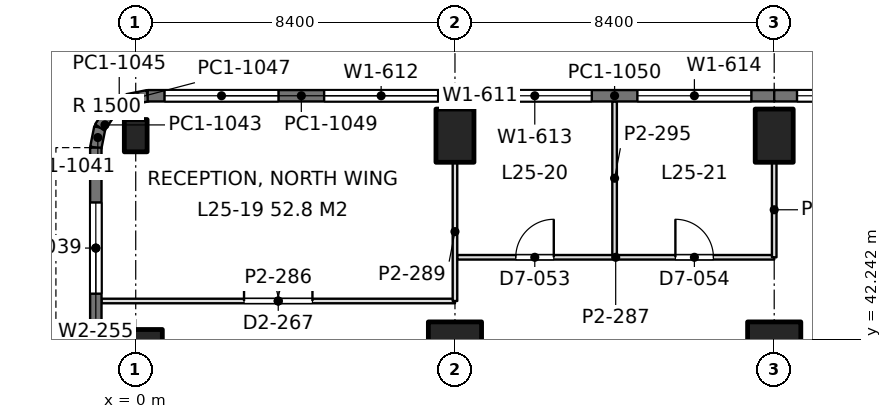
"""IFC4 building model, lengths in metres.
Left out: names, types, materials, properties, quantities, classifications, styles, units other than length and angle.
Written with IfcOpenShell. Run it as: python <this file> out.ifc"""

import sys

from ifc_helpers import new_model, si_unit, direction, frame, frame_2d, origin, origin_2d, place, context, subcontext, project, spatial, rectangle, extrude, element, fill, save


model = new_model("IFC4")
c1 = context("Model", 3, precision=1e-05, world=origin(), true_north=direction((0.0, 1.0)))
c2 = subcontext(c1, "Body", "Model", "MODEL_VIEW")
j1 = project(units=[si_unit("LENGTHUNIT", "METRE"), si_unit("PLANEANGLEUNIT", "RADIAN")], contexts=[c1])
p1 = place(None, origin())
s1 = spatial("IfcSite", under=j1, at=p1, CompositionType="ELEMENT")
p2 = place(p1, origin())
s2 = spatial("IfcBuilding", under=s1, at=p2, CompositionType="ELEMENT")
p3 = place(p2, frame((0.0, 0.0, 113.4)))
s3 = spatial("IfcBuildingStorey", under=s2, at=p3, CompositionType="ELEMENT", Elevation=113.4)
p4 = place(p3, frame((0.0, 42.0, 0.0), z_axis=(0.0, 0.0, 1.0), x_axis=(0.0, 1.0, 0.0)))
e1 = element("IfcColumn", 1, at=p4, inside=s3, PredefinedType="COLUMN", context=c2, shape_type="SweptSolid", body=[
    extrude(rectangle(XDim=1.0, YDim=1.4, at=origin_2d()), origin(), (0.0, 0.0, 1.0), 4.2),
])
p5 = place(p3, frame((0.0, 47.6, 0.0), z_axis=(0.0, 0.0, 1.0), x_axis=(1.0, 0.0, 0.0)))
e2 = element("IfcColumn", 2, at=p5, inside=s3, PredefinedType="COLUMN", context=c2, shape_type="SweptSolid", body=[
    extrude(rectangle(XDim=0.6, YDim=0.85, at=origin_2d()), origin(), (0.0, 0.0, 1.0), 4.2),
])
p6 = place(p3, frame((8.4, 42.0, 0.0), z_axis=(0.0, 0.0, 1.0), x_axis=(1.0, 0.0, 0.0)))
e3 = element("IfcColumn", 3, at=p6, inside=s3, PredefinedType="COLUMN", context=c2, shape_type="SweptSolid", body=[
    extrude(rectangle(XDim=1.4, YDim=1.4, at=origin_2d()), origin(), (0.0, 0.0, 1.0), 4.2),
])
p7 = place(p3, frame((8.4, 47.6, 0.0), z_axis=(0.0, 0.0, 1.0), x_axis=(1.0, 0.0, 0.0)))
e4 = element("IfcColumn", 4, at=p7, inside=s3, PredefinedType="COLUMN", context=c2, shape_type="SweptSolid", body=[
    extrude(rectangle(XDim=1.0, YDim=1.4, at=origin_2d()), origin(), (0.0, 0.0, 1.0), 4.2),
])
p8 = place(p3, frame((16.8, 42.0, 0.0), z_axis=(0.0, 0.0, 1.0), x_axis=(1.0, 0.0, 0.0)))
e5 = element("IfcColumn", 5, at=p8, inside=s3, PredefinedType="COLUMN", context=c2, shape_type="SweptSolid", body=[
    extrude(rectangle(XDim=1.4, YDim=1.4, at=origin_2d()), origin(), (0.0, 0.0, 1.0), 4.2),
])
p9 = place(p3, frame((16.8, 47.6, 0.0), z_axis=(0.0, 0.0, 1.0), x_axis=(1.0, 0.0, 0.0)))
e6 = element("IfcColumn", 6, at=p9, inside=s3, PredefinedType="COLUMN", context=c2, shape_type="SweptSolid", body=[
    extrude(rectangle(XDim=1.0, YDim=1.4, at=origin_2d()), origin(), (0.0, 0.0, 1.0), 4.2),
])
p10 = place(p3, frame((-1.05, 42.0, 0.0), z_axis=(0.0, 0.0, 1.0), x_axis=(0.0, 1.0, 0.0)))
e7 = element("IfcWall", 7, at=p10, inside=s3, PredefinedType="SOLIDWALL", context=c2, shape_type="SweptSolid", body=[
    extrude(rectangle(XDim=5.285, YDim=0.3, at=frame_2d((2.643, 0.0))), origin(), (0.0, 0.0, 1.0), 4.05),
])
p11 = place(p10, frame((1.443, 0.0, 0.9)))
e8 = element("IfcOpeningElement", 8, at=p11, cuts=e7, PredefinedType="OPENING", context=c2, shape_type="SweptSolid", body=[
    extrude(rectangle(XDim=2.4, YDim=1.9, at=frame_2d((1.2, 0.95))), frame((0.0, 0.16, 0.0), z_axis=(0.0, -1.0, 0.0), x_axis=(1.0, 0.0, 0.0)), (0.0, 0.0, 1.0), 0.32),
])
p12 = place(p3, frame((-1.05, 47.285, 0.0), z_axis=(0.0, 0.0, 1.0), x_axis=(0.195073962632, 0.980788534345, 0.0)))
e9 = element("IfcWall", 9, at=p12, inside=s3, PredefinedType="SOLIDWALL", context=c2, shape_type="SweptSolid", body=[
    extrude(rectangle(XDim=0.541, YDim=0.3, at=frame_2d((0.271, 0.0))), origin(), (0.0, 0.0, 1.0), 4.05),
])
p13 = place(p3, frame((-0.945, 47.815, 0.0), z_axis=(0.0, 0.0, 1.0), x_axis=(0.55534295404, 0.831621430339, 0.0)))
e10 = element("IfcWall", 10, at=p13, inside=s3, PredefinedType="SOLIDWALL", context=c2, shape_type="SweptSolid", body=[
    extrude(rectangle(XDim=0.526, YDim=0.3, at=frame_2d((0.263, 0.0))), origin(), (0.0, 0.0, 1.0), 4.05),
])
p14 = place(p3, frame((-0.653, 48.253, 0.0), z_axis=(0.0, 0.0, 1.0), x_axis=(0.831692711774, 0.555236195849, 0.0)))
e11 = element("IfcWall", 11, at=p14, inside=s3, PredefinedType="SOLIDWALL", context=c2, shape_type="SweptSolid", body=[
    extrude(rectangle(XDim=0.525, YDim=0.3, at=frame_2d((0.263, 0.0))), origin(), (0.0, 0.0, 1.0), 4.05),
])
p15 = place(p3, frame((-0.216, 48.544, 0.0), z_axis=(0.0, 0.0, 1.0), x_axis=(0.980788534345, 0.195073962632, 0.0)))
e12 = element("IfcWall", 12, at=p15, inside=s3, PredefinedType="SOLIDWALL", context=c2, shape_type="SweptSolid", body=[
    extrude(rectangle(XDim=0.541, YDim=0.3, at=frame_2d((0.271, 0.0))), origin(), (0.0, 0.0, 1.0), 4.05),
])
p16 = place(p3, frame((0.315, 48.65, 0.0), z_axis=(0.0, 0.0, 1.0), x_axis=(1.0, 0.0, 0.0)))
e13 = element("IfcWall", 13, at=p16, inside=s3, PredefinedType="SOLIDWALL", context=c2, shape_type="SweptSolid", body=[
    extrude(rectangle(XDim=8.085, YDim=0.3, at=frame_2d((4.042, 0.0))), origin(), (0.0, 0.0, 1.0), 4.05),
])
p17 = place(p16, frame((0.443, 0.0, 0.9)))
e14 = element("IfcOpeningElement", 14, at=p17, cuts=e13, PredefinedType="OPENING", context=c2, shape_type="SweptSolid", body=[
    extrude(rectangle(XDim=3.0, YDim=1.9, at=frame_2d((1.5, 0.95))), frame((0.0, 0.16, 0.0), z_axis=(0.0, -1.0, 0.0), x_axis=(1.0, 0.0, 0.0)), (0.0, 0.0, 1.0), 0.32),
])
p18 = place(p16, frame((4.643, 0.0, 0.9)))
e15 = element("IfcOpeningElement", 15, at=p18, cuts=e13, PredefinedType="OPENING", context=c2, shape_type="SweptSolid", body=[
    extrude(rectangle(XDim=3.0, YDim=1.9, at=frame_2d((1.5, 0.95))), frame((0.0, 0.16, 0.0), z_axis=(0.0, -1.0, 0.0), x_axis=(1.0, 0.0, 0.0)), (0.0, 0.0, 1.0), 0.32),
])
p19 = place(p3, frame((8.4, 48.65, 0.0), z_axis=(0.0, 0.0, 1.0), x_axis=(1.0, 0.0, 0.0)))
e16 = element("IfcWall", 16, at=p19, inside=s3, PredefinedType="SOLIDWALL", context=c2, shape_type="SweptSolid", body=[
    extrude(rectangle(XDim=8.4, YDim=0.3, at=frame_2d((4.2, 0.0))), origin(), (0.0, 0.0, 1.0), 4.05),
])
p20 = place(p19, frame((0.6, 0.0, 0.9)))
e17 = element("IfcOpeningElement", 17, at=p20, cuts=e16, PredefinedType="OPENING", context=c2, shape_type="SweptSolid", body=[
    extrude(rectangle(XDim=3.0, YDim=1.9, at=frame_2d((1.5, 0.95))), frame((0.0, 0.16, 0.0), z_axis=(0.0, -1.0, 0.0), x_axis=(1.0, 0.0, 0.0)), (0.0, 0.0, 1.0), 0.32),
])
p21 = place(p19, frame((4.8, 0.0, 0.9)))
e18 = element("IfcOpeningElement", 18, at=p21, cuts=e16, PredefinedType="OPENING", context=c2, shape_type="SweptSolid", body=[
    extrude(rectangle(XDim=3.0, YDim=1.9, at=frame_2d((1.5, 0.95))), frame((0.0, 0.16, 0.0), z_axis=(0.0, -1.0, 0.0), x_axis=(1.0, 0.0, 0.0)), (0.0, 0.0, 1.0), 0.32),
])
p22 = place(p3, frame((16.8, 48.65, 0.0), z_axis=(0.0, 0.0, 1.0), x_axis=(1.0, 0.0, 0.0)))
e19 = element("IfcWall", 19, at=p22, inside=s3, PredefinedType="SOLIDWALL", context=c2, shape_type="SweptSolid", body=[
    extrude(rectangle(XDim=8.4, YDim=0.3, at=frame_2d((4.2, 0.0))), origin(), (0.0, 0.0, 1.0), 4.05),
])
p23 = place(p22, frame((0.6, 0.0, 0.9)))
e20 = element("IfcOpeningElement", 20, at=p23, cuts=e19, PredefinedType="OPENING", context=c2, shape_type="SweptSolid", body=[
    extrude(rectangle(XDim=3.0, YDim=1.9, at=frame_2d((1.5, 0.95))), frame((0.0, 0.16, 0.0), z_axis=(0.0, -1.0, 0.0), x_axis=(1.0, 0.0, 0.0)), (0.0, 0.0, 1.0), 0.32),
])
p24 = place(p22, frame((4.8, 0.0, 0.9)))
e21 = element("IfcOpeningElement", 21, at=p24, cuts=e19, PredefinedType="OPENING", context=c2, shape_type="SweptSolid", body=[
    extrude(rectangle(XDim=3.0, YDim=1.9, at=frame_2d((1.5, 0.95))), frame((0.0, 0.16, 0.0), z_axis=(0.0, -1.0, 0.0), x_axis=(1.0, 0.0, 0.0)), (0.0, 0.0, 1.0), 0.32),
])
p25 = place(p3, frame((-0.902, 43.25, 0.0), z_axis=(0.0, 0.0, 1.0), x_axis=(1.0, 0.0, 0.0)))
e22 = element("IfcWall", 22, at=p25, inside=s3, PredefinedType="PARTITIONING", context=c2, shape_type="SweptSolid", body=[
    extrude(rectangle(XDim=9.302, YDim=0.12, at=frame_2d((4.651, 0.0))), origin(), (0.0, 0.0, 1.0), 3.55),
])
p26 = place(p25, frame((3.752, 0.0, 0.0)))
e23 = element("IfcOpeningElement", 23, at=p26, cuts=e22, PredefinedType="OPENING", context=c2, shape_type="SweptSolid", body=[
    extrude(rectangle(XDim=1.8, YDim=2.2, at=frame_2d((0.9, 1.1))), frame((0.0, 0.07, 0.0), z_axis=(0.0, -1.0, 0.0), x_axis=(1.0, 0.0, 0.0)), (0.0, 0.0, 1.0), 0.14),
])
p27 = place(p3, frame((8.458, 44.4, 0.0), z_axis=(0.0, 0.0, 1.0), x_axis=(1.0, 0.0, 0.0)))
e24 = element("IfcWall", 24, at=p27, inside=s3, PredefinedType="PARTITIONING", context=c2, shape_type="SweptSolid", body=[
    extrude(rectangle(XDim=8.342, YDim=0.12, at=frame_2d((4.171, 0.0))), origin(), (0.0, 0.0, 1.0), 3.55),
])
p28 = place(p27, frame((1.542, 0.0, 0.0)))
e25 = element("IfcOpeningElement", 25, at=p28, cuts=e24, PredefinedType="OPENING", context=c2, shape_type="SweptSolid", body=[
    extrude(rectangle(XDim=1.0, YDim=2.4, at=frame_2d((0.5, 1.2))), frame((0.0, 0.07, 0.0), z_axis=(0.0, -1.0, 0.0), x_axis=(1.0, 0.0, 0.0)), (0.0, 0.0, 1.0), 0.14),
])
p29 = place(p27, frame((5.742, 0.0, 0.0)))
e26 = element("IfcOpeningElement", 26, at=p29, cuts=e24, PredefinedType="OPENING", context=c2, shape_type="SweptSolid", body=[
    extrude(rectangle(XDim=1.0, YDim=2.4, at=frame_2d((0.5, 1.2))), frame((0.0, 0.07, 0.0), z_axis=(0.0, -1.0, 0.0), x_axis=(1.0, 0.0, 0.0)), (0.0, 0.0, 1.0), 0.14),
])
p30 = place(p3, frame((8.4, 43.25, 0.0), z_axis=(0.0, 0.0, 1.0), x_axis=(0.0, 1.0, 0.0)))
e27 = element("IfcWall", 27, at=p30, inside=s3, PredefinedType="PARTITIONING", context=c2, shape_type="SweptSolid", body=[
    extrude(rectangle(XDim=3.651, YDim=0.12, at=frame_2d((1.825, 0.0))), origin(), (0.0, 0.0, 1.0), 3.55),
])
p31 = place(p3, frame((12.6, 44.458, 0.0), z_axis=(0.0, 0.0, 1.0), x_axis=(0.0, 1.0, 0.0)))
e28 = element("IfcWall", 28, at=p31, inside=s3, PredefinedType="PARTITIONING", context=c2, shape_type="SweptSolid", body=[
    extrude(rectangle(XDim=4.044, YDim=0.12, at=frame_2d((2.022, 0.0))), origin(), (0.0, 0.0, 1.0), 3.56),
])
p32 = place(p3, frame((16.8, 44.4, 0.0), z_axis=(0.0, 0.0, 1.0), x_axis=(0.0, 1.0, 0.0)))
e29 = element("IfcWall", 29, at=p32, inside=s3, PredefinedType="PARTITIONING", context=c2, shape_type="SweptSolid", body=[
    extrude(rectangle(XDim=2.501, YDim=0.12, at=frame_2d((1.25, 0.0))), origin(), (0.0, 0.0, 1.0), 3.55),
])
p33 = place(p11, origin())
e30 = element("IfcWindow", 30, at=p33, inside=s3, PartitioningType="SINGLE_PANEL", PredefinedType="WINDOW", context=c2, shape_type="SweptSolid", body=[
    extrude(rectangle(XDim=2.4, YDim=1.9, at=frame_2d((1.2, 0.95))), frame((0.0, 0.03, 0.0), z_axis=(0.0, -1.0, 0.0), x_axis=(1.0, 0.0, 0.0)), (0.0, 0.0, 1.0), 0.06),
])
fill(e8, e30)
p34 = place(p17, origin())
e31 = element("IfcWindow", 31, at=p34, inside=s3, PartitioningType="SINGLE_PANEL", PredefinedType="WINDOW", context=c2, shape_type="SweptSolid", body=[
    extrude(rectangle(XDim=3.0, YDim=1.9, at=frame_2d((1.5, 0.95))), frame((0.0, 0.03, 0.0), z_axis=(0.0, -1.0, 0.0), x_axis=(1.0, 0.0, 0.0)), (0.0, 0.0, 1.0), 0.06),
])
fill(e14, e31)
p35 = place(p18, origin())
e32 = element("IfcWindow", 32, at=p35, inside=s3, PartitioningType="SINGLE_PANEL", PredefinedType="WINDOW", context=c2, shape_type="SweptSolid", body=[
    extrude(rectangle(XDim=3.0, YDim=1.9, at=frame_2d((1.5, 0.95))), frame((0.0, 0.03, 0.0), z_axis=(0.0, -1.0, 0.0), x_axis=(1.0, 0.0, 0.0)), (0.0, 0.0, 1.0), 0.06),
])
fill(e15, e32)
p36 = place(p20, origin())
e33 = element("IfcWindow", 33, at=p36, inside=s3, PartitioningType="SINGLE_PANEL", PredefinedType="WINDOW", context=c2, shape_type="SweptSolid", body=[
    extrude(rectangle(XDim=3.0, YDim=1.9, at=frame_2d((1.5, 0.95))), frame((0.0, 0.03, 0.0), z_axis=(0.0, -1.0, 0.0), x_axis=(1.0, 0.0, 0.0)), (0.0, 0.0, 1.0), 0.06),
])
fill(e17, e33)
p37 = place(p21, origin())
e34 = element("IfcWindow", 34, at=p37, inside=s3, PartitioningType="SINGLE_PANEL", PredefinedType="WINDOW", context=c2, shape_type="SweptSolid", body=[
    extrude(rectangle(XDim=3.0, YDim=1.9, at=frame_2d((1.5, 0.95))), frame((0.0, 0.03, 0.0), z_axis=(0.0, -1.0, 0.0), x_axis=(1.0, 0.0, 0.0)), (0.0, 0.0, 1.0), 0.06),
])
fill(e18, e34)
p38 = place(p23, origin())
e35 = element("IfcWindow", 35, at=p38, inside=s3, PartitioningType="SINGLE_PANEL", PredefinedType="WINDOW", context=c2, shape_type="SweptSolid", body=[
    extrude(rectangle(XDim=3.0, YDim=1.9, at=frame_2d((1.5, 0.95))), frame((0.0, 0.03, 0.0), z_axis=(0.0, -1.0, 0.0), x_axis=(1.0, 0.0, 0.0)), (0.0, 0.0, 1.0), 0.06),
])
fill(e20, e35)
p39 = place(p26, origin())
e36 = element("IfcDoor", 36, at=p39, inside=s3, OperationType="DOUBLE_DOOR_SINGLE_SWING", PredefinedType="DOOR", context=c2, shape_type="SweptSolid", body=[
    extrude(rectangle(XDim=1.8, YDim=2.2, at=frame_2d((0.9, 1.1))), frame((0.0, 0.025, 0.0), z_axis=(0.0, -1.0, 0.0), x_axis=(1.0, 0.0, 0.0)), (0.0, 0.0, 1.0), 0.05),
])
fill(e23, e36)
p40 = place(p28, origin())
e37 = element("IfcDoor", 37, at=p40, inside=s3, OperationType="SINGLE_SWING_RIGHT", PredefinedType="DOOR", context=c2, shape_type="SweptSolid", body=[
    extrude(rectangle(XDim=1.0, YDim=2.4, at=frame_2d((0.5, 1.2))), frame((0.0, 0.025, 0.0), z_axis=(0.0, -1.0, 0.0), x_axis=(1.0, 0.0, 0.0)), (0.0, 0.0, 1.0), 0.05),
])
fill(e25, e37)
p41 = place(p29, origin())
e38 = element("IfcDoor", 38, at=p41, inside=s3, OperationType="SINGLE_SWING_LEFT", PredefinedType="DOOR", context=c2, shape_type="SweptSolid", body=[
    extrude(rectangle(XDim=1.0, YDim=2.4, at=frame_2d((0.5, 1.2))), frame((0.0, 0.025, 0.0), z_axis=(0.0, -1.0, 0.0), x_axis=(1.0, 0.0, 0.0)), (0.0, 0.0, 1.0), 0.05),
])
fill(e26, e38)
save(model, sys.argv[1])
